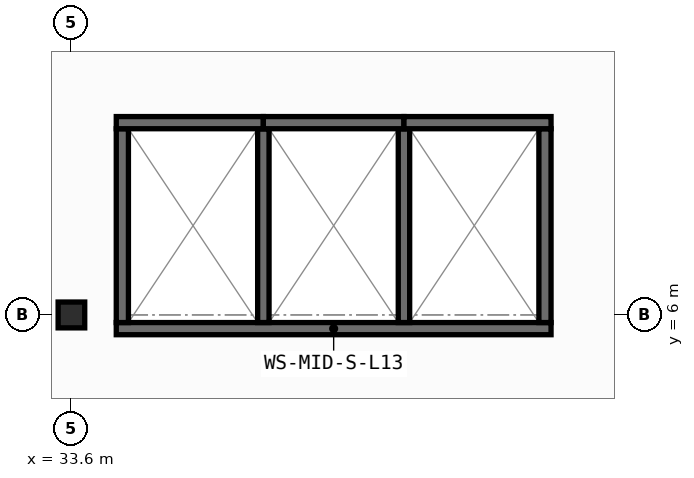
"""IFC4 building model, lengths in metres.
Left out: names, types, materials, properties, quantities, classifications, styles, units other than length and angle.
Written with IfcOpenShell. Run it as: python <this file> out.ifc"""

import sys

from ifc_helpers import new_model, si_unit, direction, frame, frame_2d, origin, origin_2d, place, context, subcontext, project, spatial, rectangle, i_section, extrude, element, save


model = new_model("IFC4")
c1 = context("Model", 3, precision=1e-05, world=origin(), true_north=direction((0.0, 1.0)))
c2 = subcontext(c1, "Body", "Model", "MODEL_VIEW")
j1 = project(units=[si_unit("LENGTHUNIT", "METRE"), si_unit("PLANEANGLEUNIT", "RADIAN")], contexts=[c1])
p1 = place(None, origin())
s1 = spatial("IfcSite", under=j1, at=p1, CompositionType="ELEMENT")
p2 = place(p1, origin())
s2 = spatial("IfcBuilding", under=s1, at=p2, CompositionType="ELEMENT")
p3 = place(p2, frame((0.0, 0.0, 54.1)))
s3 = spatial("IfcBuildingStorey", under=s2, at=p3, CompositionType="ELEMENT", Elevation=54.1)
p4 = place(p3, frame((33.6, 6.0, 0.0), z_axis=(0.0, 0.0, 1.0), x_axis=(1.0, 0.0, 0.0)))
e1 = element("IfcColumn", 1, at=p4, inside=s3, PredefinedType="COLUMN", context=c2, shape_type="SweptSolid", body=[
    extrude(i_section(OverallWidth=0.35, OverallDepth=0.34, WebThickness=0.016, FlangeThickness=0.028, at=origin_2d()), origin(), (0.0, 0.0, 1.0), 3.95),
])
p5 = place(p3, frame((34.19, 5.82, 0.0), z_axis=(0.0, 0.0, 1.0), x_axis=(1.0, 0.0, 0.0)))
e2 = element("IfcWall", 2, at=p5, inside=s3, PredefinedType="SHEAR", context=c2, shape_type="SweptSolid", body=[
    extrude(rectangle(XDim=5.72, YDim=0.16, at=frame_2d((2.86, 0.0))), origin(), (0.0, 0.0, 1.0), 3.71),
])
for number, where, z_axis, x_axis in (
    (3, (34.27, 5.9, 0.0), (0.0, 0.0, 1.0), (0.0, 1.0, 0.0)),
    (4, (39.83, 5.9, 0.0), (0.0, 0.0, 1.0), (0.0, 1.0, 0.0)),
):
    element("IfcWall", number, at=place(p3, frame(where, z_axis=z_axis, x_axis=x_axis)), inside=s3, PredefinedType="SHEAR", context=c2, shape_type="SweptSolid", body=[
        extrude(rectangle(XDim=2.55, YDim=0.16, at=frame_2d((1.275, 0.0))), origin(), (0.0, 0.0, 1.0), 3.71),
    ])
for number, where, z_axis, x_axis in (
    (5, (36.125, 5.9, 0.0), (0.0, 0.0, 1.0), (0.0, 1.0, 0.0)),
    (6, (37.975, 5.9, 0.0), (0.0, 0.0, 1.0), (0.0, 1.0, 0.0)),
):
    element("IfcWall", number, at=place(p3, frame(where, z_axis=z_axis, x_axis=x_axis)), inside=s3, PredefinedType="SHEAR", context=c2, shape_type="SweptSolid", body=[
        extrude(rectangle(XDim=2.55, YDim=0.15, at=frame_2d((1.275, 0.0))), origin(), (0.0, 0.0, 1.0), 3.71),
    ])
p6 = place(p3, frame((34.19, 8.53, 0.0), z_axis=(0.0, 0.0, 1.0), x_axis=(1.0, 0.0, 0.0)))
e7 = element("IfcWall", 7, at=p6, inside=s3, PredefinedType="SHEAR", context=c2, shape_type="SweptSolid", body=[
    extrude(rectangle(XDim=1.935, YDim=0.16, at=frame_2d((0.968, 0.0))), origin(), (0.0, 0.0, 1.0), 3.71),
])
p7 = place(p3, frame((36.125, 8.53, 0.0), z_axis=(0.0, 0.0, 1.0), x_axis=(1.0, 0.0, 0.0)))
e8 = element("IfcWall", 8, at=p7, inside=s3, PredefinedType="SHEAR", context=c2, shape_type="SweptSolid", body=[
    extrude(rectangle(XDim=1.85, YDim=0.16, at=frame_2d((0.925, 0.0))), origin(), (0.0, 0.0, 1.0), 3.71),
])
p8 = place(p3, frame((37.975, 8.53, 0.0), z_axis=(0.0, 0.0, 1.0), x_axis=(1.0, 0.0, 0.0)))
e9 = element("IfcWall", 9, at=p8, inside=s3, PredefinedType="SHEAR", context=c2, shape_type="SweptSolid", body=[
    extrude(rectangle(XDim=1.935, YDim=0.16, at=frame_2d((0.967, 0.0))), origin(), (0.0, 0.0, 1.0), 3.71),
])
save(model, sys.argv[1])
